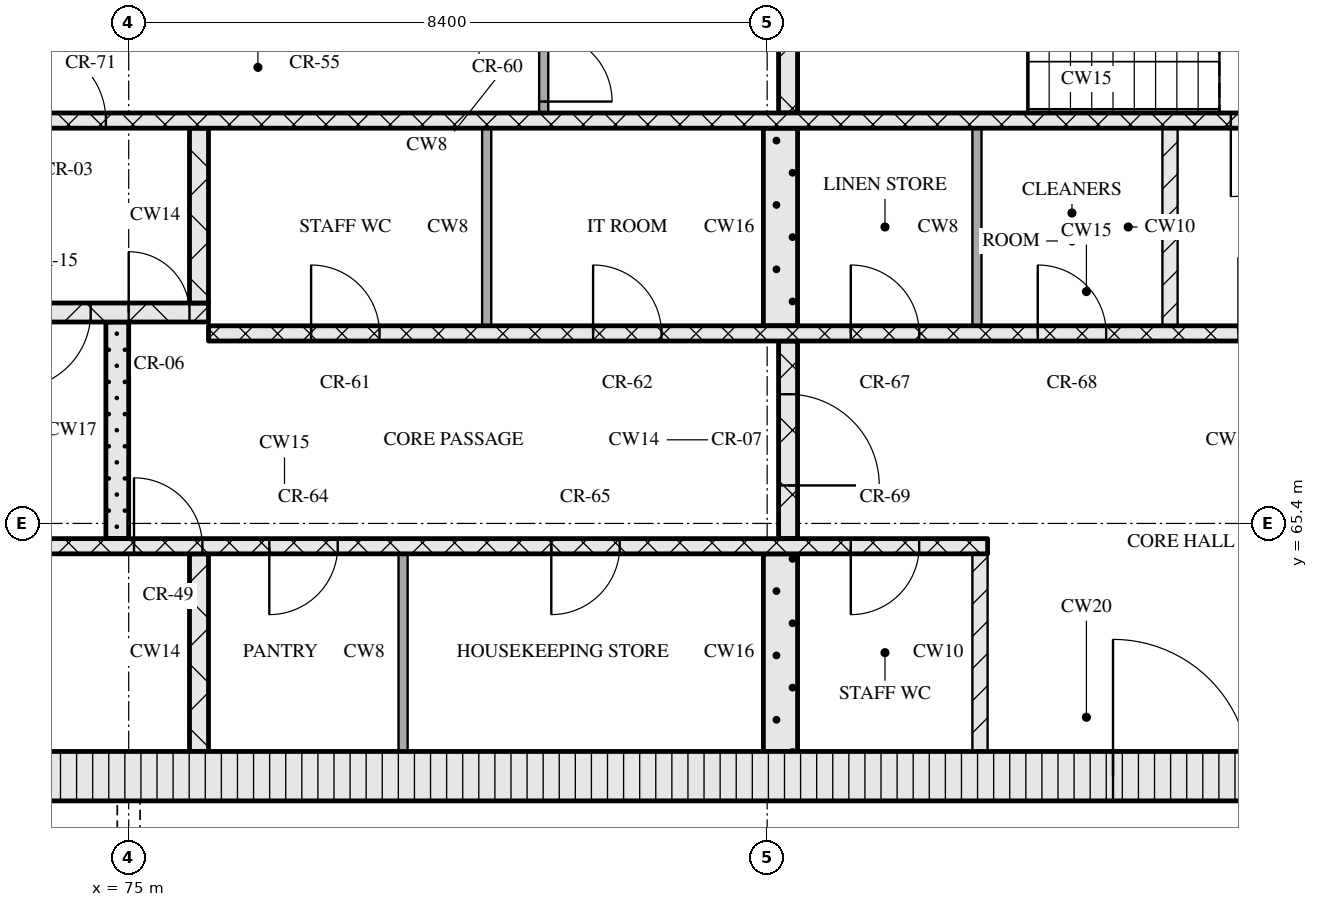
"""IFC4 building model, lengths in metres.
Left out: names, types, materials, properties, quantities, classifications, styles, units other than length and angle.
Written with IfcOpenShell. Run it as: python <this file> out.ifc"""

import sys

from ifc_helpers import new_model, si_unit, direction, frame, frame_2d, origin, place, context, subcontext, project, spatial, rectangle, extrude, element, fill, save


model = new_model("IFC4")
c1 = context("Model", 3, precision=1e-05, world=origin(), true_north=direction((0.0, 1.0)))
c2 = subcontext(c1, "Body", "Model", "MODEL_VIEW")
j1 = project(units=[si_unit("LENGTHUNIT", "METRE"), si_unit("PLANEANGLEUNIT", "RADIAN")], contexts=[c1])
p1 = place(None, origin())
s1 = spatial("IfcSite", under=j1, at=p1, CompositionType="ELEMENT")
p2 = place(p1, origin())
s2 = spatial("IfcBuilding", under=s1, at=p2, CompositionType="ELEMENT")
p3 = place(p2, frame((0.0, 0.0, 234.3)))
s3 = spatial("IfcBuildingStorey", under=s2, at=p3, CompositionType="ELEMENT", Elevation=234.3)
p4 = place(p3, frame((67.15, 62.075, 0.0), z_axis=(0.0, 0.0, 1.0), x_axis=(1.0, 0.0, 0.0)))
e1 = element("IfcWall", 1, at=p4, inside=s3, PredefinedType="SOLIDWALL", context=c2, shape_type="SweptSolid", body=[
    extrude(rectangle(XDim=40.9, YDim=0.65, at=frame_2d((20.45, 0.0))), origin(), (0.0, 0.0, 1.0), 3.32),
])
p5 = place(p4, frame((20.8, 0.0, 0.0)))
e2 = element("IfcOpeningElement", 2, at=p5, cuts=e1, PredefinedType="OPENING", context=c2, shape_type="SweptSolid", body=[
    extrude(rectangle(XDim=1.8, YDim=2.1, at=frame_2d((0.9, 1.05))), frame((0.0, 0.335, 0.0), z_axis=(0.0, -1.0, 0.0), x_axis=(1.0, 0.0, 0.0)), (0.0, 0.0, 1.0), 0.67),
])
p6 = place(p3, frame((75.925, 62.4, 0.0), z_axis=(0.0, 0.0, 1.0), x_axis=(0.0, 1.0, 0.0)))
e3 = element("IfcWall", 3, at=p6, inside=s3, PredefinedType="SOLIDWALL", context=c2, shape_type="SweptSolid", body=[
    extrude(rectangle(XDim=2.6, YDim=0.25, at=frame_2d((1.3, 0.0))), origin(), (0.0, 0.0, 1.0), 3.32),
])
p7 = place(p3, frame((78.61, 62.4, 0.0), z_axis=(0.0, 0.0, 1.0), x_axis=(0.0, 1.0, 0.0)))
e4 = element("IfcWall", 4, at=p7, inside=s3, PredefinedType="PARTITIONING", context=c2, shape_type="SweptSolid", body=[
    extrude(rectangle(XDim=2.6, YDim=0.12, at=frame_2d((1.3, 0.0))), origin(), (0.0, 0.0, 1.0), 3.32),
])
p8 = place(p3, frame((83.575, 62.4, 0.0), z_axis=(0.0, 0.0, 1.0), x_axis=(0.0, 1.0, 0.0)))
e5 = element("IfcWall", 5, at=p8, inside=s3, PredefinedType="SOLIDWALL", context=c2, shape_type="SweptSolid", body=[
    extrude(rectangle(XDim=2.6, YDim=0.45, at=frame_2d((1.3, 0.0))), origin(), (0.0, 0.0, 1.0), 3.32),
])
p9 = place(p3, frame((86.2, 62.4, 0.0), z_axis=(0.0, 0.0, 1.0), x_axis=(0.0, 1.0, 0.0)))
e6 = element("IfcWall", 6, at=p9, inside=s3, PredefinedType="PARTITIONING", context=c2, shape_type="SweptSolid", body=[
    extrude(rectangle(XDim=2.6, YDim=0.2, at=frame_2d((1.3, 0.0))), origin(), (0.0, 0.0, 1.0), 3.32),
])
p10 = place(p3, frame((67.8, 65.1, 0.0), z_axis=(0.0, 0.0, 1.0), x_axis=(1.0, 0.0, 0.0)))
e7 = element("IfcWall", 7, at=p10, inside=s3, PredefinedType="SOLIDWALL", context=c2, shape_type="SweptSolid", body=[
    extrude(rectangle(XDim=18.5, YDim=0.2, at=frame_2d((9.25, 0.0))), origin(), (0.0, 0.0, 1.0), 3.32),
])
p11 = place(p10, frame((7.27, 0.0, 0.0)))
e8 = element("IfcOpeningElement", 8, at=p11, cuts=e7, PredefinedType="OPENING", context=c2, shape_type="SweptSolid", body=[
    extrude(rectangle(XDim=0.9, YDim=2.1, at=frame_2d((0.45, 1.05))), frame((0.0, 0.11, 0.0), z_axis=(0.0, -1.0, 0.0), x_axis=(1.0, 0.0, 0.0)), (0.0, 0.0, 1.0), 0.22),
])
p12 = place(p10, frame((9.05, 0.0, 0.0)))
e9 = element("IfcOpeningElement", 9, at=p12, cuts=e7, PredefinedType="OPENING", context=c2, shape_type="SweptSolid", body=[
    extrude(rectangle(XDim=0.9, YDim=2.1, at=frame_2d((0.45, 1.05))), frame((0.0, 0.11, 0.0), z_axis=(0.0, -1.0, 0.0), x_axis=(1.0, 0.0, 0.0)), (0.0, 0.0, 1.0), 0.22),
])
p13 = place(p10, frame((12.76, 0.0, 0.0)))
e10 = element("IfcOpeningElement", 10, at=p13, cuts=e7, PredefinedType="OPENING", context=c2, shape_type="SweptSolid", body=[
    extrude(rectangle(XDim=0.9, YDim=2.1, at=frame_2d((0.45, 1.05))), frame((0.0, 0.11, 0.0), z_axis=(0.0, -1.0, 0.0), x_axis=(1.0, 0.0, 0.0)), (0.0, 0.0, 1.0), 0.22),
])
p14 = place(p10, frame((16.7, 0.0, 0.0)))
e11 = element("IfcOpeningElement", 11, at=p14, cuts=e7, PredefinedType="OPENING", context=c2, shape_type="SweptSolid", body=[
    extrude(rectangle(XDim=0.9, YDim=2.1, at=frame_2d((0.45, 1.05))), frame((0.0, 0.11, 0.0), z_axis=(0.0, -1.0, 0.0), x_axis=(1.0, 0.0, 0.0)), (0.0, 0.0, 1.0), 0.22),
])
p15 = place(p3, frame((74.85, 65.2, 0.0), z_axis=(0.0, 0.0, 1.0), x_axis=(0.0, 1.0, 0.0)))
e12 = element("IfcWall", 12, at=p15, inside=s3, PredefinedType="SOLIDWALL", context=c2, shape_type="SweptSolid", body=[
    extrude(rectangle(XDim=2.85, YDim=0.3, at=frame_2d((1.425, 0.0))), origin(), (0.0, 0.0, 1.0), 3.32),
])
p16 = place(p3, frame((83.675, 65.2, 0.0), z_axis=(0.0, 0.0, 1.0), x_axis=(0.0, 1.0, 0.0)))
e13 = element("IfcWall", 13, at=p16, inside=s3, PredefinedType="SOLIDWALL", context=c2, shape_type="SweptSolid", body=[
    extrude(rectangle(XDim=2.6, YDim=0.25, at=frame_2d((1.3, 0.0))), origin(), (0.0, 0.0, 1.0), 3.32),
])
p17 = place(p16, frame((0.7, 0.0, 0.0)))
e14 = element("IfcOpeningElement", 14, at=p17, cuts=e13, PredefinedType="OPENING", context=c2, shape_type="SweptSolid", body=[
    extrude(rectangle(XDim=1.2, YDim=2.1, at=frame_2d((0.6, 1.05))), frame((0.0, 0.135, 0.0), z_axis=(0.0, -1.0, 0.0), x_axis=(1.0, 0.0, 0.0)), (0.0, 0.0, 1.0), 0.27),
])
p18 = place(p3, frame((76.05, 67.9, 0.0), z_axis=(0.0, 0.0, 1.0), x_axis=(1.0, 0.0, 0.0)))
e15 = element("IfcWall", 15, at=p18, inside=s3, PredefinedType="SOLIDWALL", context=c2, shape_type="SweptSolid", body=[
    extrude(rectangle(XDim=23.1, YDim=0.2, at=frame_2d((11.55, 0.0))), origin(), (0.0, 0.0, 1.0), 3.32),
])
p19 = place(p18, frame((1.35, 0.0, 0.0)))
e16 = element("IfcOpeningElement", 16, at=p19, cuts=e15, PredefinedType="OPENING", context=c2, shape_type="SweptSolid", body=[
    extrude(rectangle(XDim=0.9, YDim=2.1, at=frame_2d((0.45, 1.05))), frame((0.0, 0.11, 0.0), z_axis=(0.0, -1.0, 0.0), x_axis=(1.0, 0.0, 0.0)), (0.0, 0.0, 1.0), 0.22),
])
p20 = place(p18, frame((5.06, 0.0, 0.0)))
e17 = element("IfcOpeningElement", 17, at=p20, cuts=e15, PredefinedType="OPENING", context=c2, shape_type="SweptSolid", body=[
    extrude(rectangle(XDim=0.9, YDim=2.1, at=frame_2d((0.45, 1.05))), frame((0.0, 0.11, 0.0), z_axis=(0.0, -1.0, 0.0), x_axis=(1.0, 0.0, 0.0)), (0.0, 0.0, 1.0), 0.22),
])
p21 = place(p18, frame((8.45, 0.0, 0.0)))
e18 = element("IfcOpeningElement", 18, at=p21, cuts=e15, PredefinedType="OPENING", context=c2, shape_type="SweptSolid", body=[
    extrude(rectangle(XDim=0.9, YDim=2.1, at=frame_2d((0.45, 1.05))), frame((0.0, 0.11, 0.0), z_axis=(0.0, -1.0, 0.0), x_axis=(1.0, 0.0, 0.0)), (0.0, 0.0, 1.0), 0.22),
])
p22 = place(p18, frame((10.91, 0.0, 0.0)))
e19 = element("IfcOpeningElement", 19, at=p22, cuts=e15, PredefinedType="OPENING", context=c2, shape_type="SweptSolid", body=[
    extrude(rectangle(XDim=0.9, YDim=2.1, at=frame_2d((0.45, 1.05))), frame((0.0, 0.11, 0.0), z_axis=(0.0, -1.0, 0.0), x_axis=(1.0, 0.0, 0.0)), (0.0, 0.0, 1.0), 0.22),
])
p23 = place(p18, frame((13.55, 0.0, 0.0)))
e20 = element("IfcOpeningElement", 20, at=p23, cuts=e15, PredefinedType="OPENING", context=c2, shape_type="SweptSolid", body=[
    extrude(rectangle(XDim=1.0, YDim=2.1, at=frame_2d((0.5, 1.05))), frame((0.0, 0.11, 0.0), z_axis=(0.0, -1.0, 0.0), x_axis=(1.0, 0.0, 0.0)), (0.0, 0.0, 1.0), 0.22),
])
p24 = place(p18, frame((16.2, 0.0, 0.0)))
e21 = element("IfcOpeningElement", 21, at=p24, cuts=e15, PredefinedType="OPENING", context=c2, shape_type="SweptSolid", body=[
    extrude(rectangle(XDim=1.1, YDim=2.1, at=frame_2d((0.55, 1.05))), frame((0.0, 0.11, 0.0), z_axis=(0.0, -1.0, 0.0), x_axis=(1.0, 0.0, 0.0)), (0.0, 0.0, 1.0), 0.22),
])
p25 = place(p18, frame((18.7, 0.0, 0.0)))
e22 = element("IfcOpeningElement", 22, at=p25, cuts=e15, PredefinedType="OPENING", context=c2, shape_type="SweptSolid", body=[
    extrude(rectangle(XDim=1.1, YDim=2.1, at=frame_2d((0.55, 1.05))), frame((0.0, 0.11, 0.0), z_axis=(0.0, -1.0, 0.0), x_axis=(1.0, 0.0, 0.0)), (0.0, 0.0, 1.0), 0.22),
])
p26 = place(p18, frame((21.2, 0.0, 0.0)))
e23 = element("IfcOpeningElement", 23, at=p26, cuts=e15, PredefinedType="OPENING", context=c2, shape_type="SweptSolid", body=[
    extrude(rectangle(XDim=1.1, YDim=2.1, at=frame_2d((0.55, 1.05))), frame((0.0, 0.11, 0.0), z_axis=(0.0, -1.0, 0.0), x_axis=(1.0, 0.0, 0.0)), (0.0, 0.0, 1.0), 0.22),
])
p27 = place(p3, frame((79.71, 68.0, 0.0), z_axis=(0.0, 0.0, 1.0), x_axis=(0.0, 1.0, 0.0)))
e24 = element("IfcWall", 24, at=p27, inside=s3, PredefinedType="PARTITIONING", context=c2, shape_type="SweptSolid", body=[
    extrude(rectangle(XDim=2.6, YDim=0.12, at=frame_2d((1.3, 0.0))), origin(), (0.0, 0.0, 1.0), 3.32),
])
p28 = place(p3, frame((83.575, 68.0, 0.0), z_axis=(0.0, 0.0, 1.0), x_axis=(0.0, 1.0, 0.0)))
e25 = element("IfcWall", 25, at=p28, inside=s3, PredefinedType="SOLIDWALL", context=c2, shape_type="SweptSolid", body=[
    extrude(rectangle(XDim=2.6, YDim=0.45, at=frame_2d((1.3, 0.0))), origin(), (0.0, 0.0, 1.0), 3.32),
])
p29 = place(p3, frame((86.16, 68.0, 0.0), z_axis=(0.0, 0.0, 1.0), x_axis=(0.0, 1.0, 0.0)))
e26 = element("IfcWall", 26, at=p29, inside=s3, PredefinedType="PARTITIONING", context=c2, shape_type="SweptSolid", body=[
    extrude(rectangle(XDim=2.6, YDim=0.12, at=frame_2d((1.3, 0.0))), origin(), (0.0, 0.0, 1.0), 3.32),
])
p30 = place(p3, frame((88.7, 68.0, 0.0), z_axis=(0.0, 0.0, 1.0), x_axis=(0.0, 1.0, 0.0)))
e27 = element("IfcWall", 27, at=p30, inside=s3, PredefinedType="PARTITIONING", context=c2, shape_type="SweptSolid", body=[
    extrude(rectangle(XDim=2.6, YDim=0.2, at=frame_2d((1.3, 0.0))), origin(), (0.0, 0.0, 1.0), 3.32),
])
p31 = place(p3, frame((67.8, 68.175, 0.0), z_axis=(0.0, 0.0, 1.0), x_axis=(1.0, 0.0, 0.0)))
e28 = element("IfcWall", 28, at=p31, inside=s3, PredefinedType="SOLIDWALL", context=c2, shape_type="SweptSolid", body=[
    extrude(rectangle(XDim=8.25, YDim=0.25, at=frame_2d((4.125, 0.0))), origin(), (0.0, 0.0, 1.0), 3.32),
])
p32 = place(p31, frame((5.7, 0.0, 0.0)))
e29 = element("IfcOpeningElement", 29, at=p32, cuts=e28, PredefinedType="OPENING", context=c2, shape_type="SweptSolid", body=[
    extrude(rectangle(XDim=1.0, YDim=2.1, at=frame_2d((0.5, 1.05))), frame((0.0, 0.135, 0.0), z_axis=(0.0, -1.0, 0.0), x_axis=(1.0, 0.0, 0.0)), (0.0, 0.0, 1.0), 0.27),
])
p33 = place(p31, frame((7.2, 0.0, 0.0)))
e30 = element("IfcOpeningElement", 30, at=p33, cuts=e28, PredefinedType="OPENING", context=c2, shape_type="SweptSolid", body=[
    extrude(rectangle(XDim=0.8, YDim=2.1, at=frame_2d((0.4, 1.05))), frame((0.0, 0.135, 0.0), z_axis=(0.0, -1.0, 0.0), x_axis=(1.0, 0.0, 0.0)), (0.0, 0.0, 1.0), 0.27),
])
p34 = place(p3, frame((75.925, 68.3, 0.0), z_axis=(0.0, 0.0, 1.0), x_axis=(0.0, 1.0, 0.0)))
e31 = element("IfcWall", 31, at=p34, inside=s3, PredefinedType="SOLIDWALL", context=c2, shape_type="SweptSolid", body=[
    extrude(rectangle(XDim=2.3, YDim=0.25, at=frame_2d((1.15, 0.0))), origin(), (0.0, 0.0, 1.0), 3.32),
])
p35 = place(p3, frame((67.8, 70.7, 0.0), z_axis=(0.0, 0.0, 1.0), x_axis=(1.0, 0.0, 0.0)))
e32 = element("IfcWall", 32, at=p35, inside=s3, PredefinedType="SOLIDWALL", context=c2, shape_type="SweptSolid", body=[
    extrude(rectangle(XDim=39.6, YDim=0.2, at=frame_2d((19.8, 0.0))), origin(), (0.0, 0.0, 1.0), 3.32),
])
p36 = place(p35, frame((0.65, 0.0, 0.0)))
e33 = element("IfcOpeningElement", 33, at=p36, cuts=e32, PredefinedType="OPENING", context=c2, shape_type="SweptSolid", body=[
    extrude(rectangle(XDim=1.1, YDim=2.1, at=frame_2d((0.55, 1.05))), frame((0.0, 0.11, 0.0), z_axis=(0.0, -1.0, 0.0), x_axis=(1.0, 0.0, 0.0)), (0.0, 0.0, 1.0), 0.22),
])
p37 = place(p35, frame((3.25, 0.0, 0.0)))
e34 = element("IfcOpeningElement", 34, at=p37, cuts=e32, PredefinedType="OPENING", context=c2, shape_type="SweptSolid", body=[
    extrude(rectangle(XDim=1.1, YDim=2.1, at=frame_2d((0.55, 1.05))), frame((0.0, 0.11, 0.0), z_axis=(0.0, -1.0, 0.0), x_axis=(1.0, 0.0, 0.0)), (0.0, 0.0, 1.0), 0.22),
])
p38 = place(p35, frame((5.9, 0.0, 0.0)))
e35 = element("IfcOpeningElement", 35, at=p38, cuts=e32, PredefinedType="OPENING", context=c2, shape_type="SweptSolid", body=[
    extrude(rectangle(XDim=1.0, YDim=2.1, at=frame_2d((0.5, 1.05))), frame((0.0, 0.11, 0.0), z_axis=(0.0, -1.0, 0.0), x_axis=(1.0, 0.0, 0.0)), (0.0, 0.0, 1.0), 0.22),
])
p39 = place(p35, frame((21.7, 0.0, 0.0)))
e36 = element("IfcOpeningElement", 36, at=p39, cuts=e32, PredefinedType="OPENING", context=c2, shape_type="SweptSolid", body=[
    extrude(rectangle(XDim=1.0, YDim=2.1, at=frame_2d((0.5, 1.05))), frame((0.0, 0.11, 0.0), z_axis=(0.0, -1.0, 0.0), x_axis=(1.0, 0.0, 0.0)), (0.0, 0.0, 1.0), 0.22),
])
p40 = place(p35, frame((32.7, 0.0, 0.0)))
e37 = element("IfcOpeningElement", 37, at=p40, cuts=e32, PredefinedType="OPENING", context=c2, shape_type="SweptSolid", body=[
    extrude(rectangle(XDim=1.0, YDim=2.1, at=frame_2d((0.5, 1.05))), frame((0.0, 0.11, 0.0), z_axis=(0.0, -1.0, 0.0), x_axis=(1.0, 0.0, 0.0)), (0.0, 0.0, 1.0), 0.22),
])
p41 = place(p35, frame((35.25, 0.0, 0.0)))
e38 = element("IfcOpeningElement", 38, at=p41, cuts=e32, PredefinedType="OPENING", context=c2, shape_type="SweptSolid", body=[
    extrude(rectangle(XDim=1.1, YDim=2.1, at=frame_2d((0.55, 1.05))), frame((0.0, 0.11, 0.0), z_axis=(0.0, -1.0, 0.0), x_axis=(1.0, 0.0, 0.0)), (0.0, 0.0, 1.0), 0.22),
])
p42 = place(p35, frame((37.85, 0.0, 0.0)))
e39 = element("IfcOpeningElement", 39, at=p42, cuts=e32, PredefinedType="OPENING", context=c2, shape_type="SweptSolid", body=[
    extrude(rectangle(XDim=1.1, YDim=2.1, at=frame_2d((0.55, 1.05))), frame((0.0, 0.11, 0.0), z_axis=(0.0, -1.0, 0.0), x_axis=(1.0, 0.0, 0.0)), (0.0, 0.0, 1.0), 0.22),
])
p43 = place(p3, frame((80.46, 70.8, 0.0), z_axis=(0.0, 0.0, 1.0), x_axis=(0.0, 1.0, 0.0)))
e40 = element("IfcWall", 40, at=p43, inside=s3, PredefinedType="PARTITIONING", context=c2, shape_type="SweptSolid", body=[
    extrude(rectangle(XDim=1.2, YDim=0.12, at=frame_2d((0.6, 0.0))), origin(), (0.0, 0.0, 1.0), 3.32),
])
p44 = place(p43, frame((0.15, 0.0, 0.0)))
e41 = element("IfcOpeningElement", 41, at=p44, cuts=e40, PredefinedType="OPENING", context=c2, shape_type="SweptSolid", body=[
    extrude(rectangle(XDim=0.9, YDim=2.1, at=frame_2d((0.45, 1.05))), frame((0.0, 0.07, 0.0), z_axis=(0.0, -1.0, 0.0), x_axis=(1.0, 0.0, 0.0)), (0.0, 0.0, 1.0), 0.14),
])
p45 = place(p3, frame((83.675, 70.8, 0.0), z_axis=(0.0, 0.0, 1.0), x_axis=(0.0, 1.0, 0.0)))
e42 = element("IfcWall", 42, at=p45, inside=s3, PredefinedType="SOLIDWALL", context=c2, shape_type="SweptSolid", body=[
    extrude(rectangle(XDim=2.95, YDim=0.25, at=frame_2d((1.475, 0.0))), origin(), (0.0, 0.0, 1.0), 3.32),
])
p46 = place(p5, origin())
e43 = element("IfcDoor", 43, at=p46, inside=s3, OperationType="DOUBLE_DOOR_SINGLE_SWING", PredefinedType="DOOR", context=c2, shape_type="SweptSolid", body=[
    extrude(rectangle(XDim=1.8, YDim=2.1, at=frame_2d((0.9, 1.05))), frame((0.0, 0.025, 0.0), z_axis=(0.0, -1.0, 0.0), x_axis=(1.0, 0.0, 0.0)), (0.0, 0.0, 1.0), 0.05),
])
fill(e2, e43)
p47 = place(p11, origin())
e44 = element("IfcDoor", 44, at=p47, inside=s3, OperationType="SINGLE_SWING_LEFT", PredefinedType="DOOR", context=c2, shape_type="SweptSolid", body=[
    extrude(rectangle(XDim=0.9, YDim=2.1, at=frame_2d((0.45, 1.05))), frame((0.0, 0.025, 0.0), z_axis=(0.0, -1.0, 0.0), x_axis=(1.0, 0.0, 0.0)), (0.0, 0.0, 1.0), 0.05),
])
fill(e8, e44)
p48 = place(p12, origin())
e45 = element("IfcDoor", 45, at=p48, inside=s3, OperationType="SINGLE_SWING_RIGHT", PredefinedType="DOOR", context=c2, shape_type="SweptSolid", body=[
    extrude(rectangle(XDim=0.9, YDim=2.1, at=frame_2d((0.45, 1.05))), frame((0.0, 0.025, 0.0), z_axis=(0.0, -1.0, 0.0), x_axis=(1.0, 0.0, 0.0)), (0.0, 0.0, 1.0), 0.05),
])
fill(e9, e45)
p49 = place(p13, origin())
e46 = element("IfcDoor", 46, at=p49, inside=s3, OperationType="SINGLE_SWING_RIGHT", PredefinedType="DOOR", context=c2, shape_type="SweptSolid", body=[
    extrude(rectangle(XDim=0.9, YDim=2.1, at=frame_2d((0.45, 1.05))), frame((0.0, 0.025, 0.0), z_axis=(0.0, -1.0, 0.0), x_axis=(1.0, 0.0, 0.0)), (0.0, 0.0, 1.0), 0.05),
])
fill(e10, e46)
p50 = place(p14, origin())
e47 = element("IfcDoor", 47, at=p50, inside=s3, OperationType="SINGLE_SWING_RIGHT", PredefinedType="DOOR", context=c2, shape_type="SweptSolid", body=[
    extrude(rectangle(XDim=0.9, YDim=2.1, at=frame_2d((0.45, 1.05))), frame((0.0, 0.025, 0.0), z_axis=(0.0, -1.0, 0.0), x_axis=(1.0, 0.0, 0.0)), (0.0, 0.0, 1.0), 0.05),
])
fill(e11, e47)
p51 = place(p17, origin())
e48 = element("IfcDoor", 48, at=p51, inside=s3, OperationType="SINGLE_SWING_RIGHT", PredefinedType="DOOR", context=c2, shape_type="SweptSolid", body=[
    extrude(rectangle(XDim=1.2, YDim=2.1, at=frame_2d((0.6, 1.05))), frame((0.0, 0.025, 0.0), z_axis=(0.0, -1.0, 0.0), x_axis=(1.0, 0.0, 0.0)), (0.0, 0.0, 1.0), 0.05),
])
fill(e14, e48)
p52 = place(p19, origin())
e49 = element("IfcDoor", 49, at=p52, inside=s3, OperationType="SINGLE_SWING_LEFT", PredefinedType="DOOR", context=c2, shape_type="SweptSolid", body=[
    extrude(rectangle(XDim=0.9, YDim=2.1, at=frame_2d((0.45, 1.05))), frame((0.0, 0.025, 0.0), z_axis=(0.0, -1.0, 0.0), x_axis=(1.0, 0.0, 0.0)), (0.0, 0.0, 1.0), 0.05),
])
fill(e16, e49)
p53 = place(p20, origin())
e50 = element("IfcDoor", 50, at=p53, inside=s3, OperationType="SINGLE_SWING_LEFT", PredefinedType="DOOR", context=c2, shape_type="SweptSolid", body=[
    extrude(rectangle(XDim=0.9, YDim=2.1, at=frame_2d((0.45, 1.05))), frame((0.0, 0.025, 0.0), z_axis=(0.0, -1.0, 0.0), x_axis=(1.0, 0.0, 0.0)), (0.0, 0.0, 1.0), 0.05),
])
fill(e17, e50)
p54 = place(p21, origin())
e51 = element("IfcDoor", 51, at=p54, inside=s3, OperationType="SINGLE_SWING_LEFT", PredefinedType="DOOR", context=c2, shape_type="SweptSolid", body=[
    extrude(rectangle(XDim=0.9, YDim=2.1, at=frame_2d((0.45, 1.05))), frame((0.0, 0.025, 0.0), z_axis=(0.0, -1.0, 0.0), x_axis=(1.0, 0.0, 0.0)), (0.0, 0.0, 1.0), 0.05),
])
fill(e18, e51)
p55 = place(p22, origin())
e52 = element("IfcDoor", 52, at=p55, inside=s3, OperationType="SINGLE_SWING_LEFT", PredefinedType="DOOR", context=c2, shape_type="SweptSolid", body=[
    extrude(rectangle(XDim=0.9, YDim=2.1, at=frame_2d((0.45, 1.05))), frame((0.0, 0.025, 0.0), z_axis=(0.0, -1.0, 0.0), x_axis=(1.0, 0.0, 0.0)), (0.0, 0.0, 1.0), 0.05),
])
fill(e19, e52)
p56 = place(p32, origin())
e53 = element("IfcDoor", 53, at=p56, inside=s3, OperationType="SINGLE_SWING_RIGHT", PredefinedType="DOOR", context=c2, shape_type="SweptSolid", body=[
    extrude(rectangle(XDim=1.0, YDim=2.1, at=frame_2d((0.5, 1.05))), frame((0.0, 0.025, 0.0), z_axis=(0.0, -1.0, 0.0), x_axis=(1.0, 0.0, 0.0)), (0.0, 0.0, 1.0), 0.05),
])
fill(e29, e53)
p57 = place(p33, origin())
e54 = element("IfcDoor", 54, at=p57, inside=s3, OperationType="SINGLE_SWING_LEFT", PredefinedType="DOOR", context=c2, shape_type="SweptSolid", body=[
    extrude(rectangle(XDim=0.8, YDim=2.1, at=frame_2d((0.4, 1.05))), frame((0.0, 0.025, 0.0), z_axis=(0.0, -1.0, 0.0), x_axis=(1.0, 0.0, 0.0)), (0.0, 0.0, 1.0), 0.05),
])
fill(e30, e54)
p58 = place(p38, origin())
e55 = element("IfcDoor", 55, at=p58, inside=s3, OperationType="SINGLE_SWING_LEFT", PredefinedType="DOOR", context=c2, shape_type="SweptSolid", body=[
    extrude(rectangle(XDim=1.0, YDim=2.1, at=frame_2d((0.5, 1.05))), frame((0.0, 0.025, 0.0), z_axis=(0.0, -1.0, 0.0), x_axis=(1.0, 0.0, 0.0)), (0.0, 0.0, 1.0), 0.05),
])
fill(e35, e55)
p59 = place(p39, origin())
e56 = element("IfcDoor", 56, at=p59, inside=s3, OperationType="SINGLE_SWING_RIGHT", PredefinedType="DOOR", context=c2, shape_type="SweptSolid", body=[
    extrude(rectangle(XDim=1.0, YDim=2.1, at=frame_2d((0.5, 1.05))), frame((0.0, 0.025, 0.0), z_axis=(0.0, -1.0, 0.0), x_axis=(1.0, 0.0, 0.0)), (0.0, 0.0, 1.0), 0.05),
])
fill(e36, e56)
p60 = place(p44, origin())
e57 = element("IfcDoor", 57, at=p60, inside=s3, OperationType="SINGLE_SWING_RIGHT", PredefinedType="DOOR", context=c2, shape_type="SweptSolid", body=[
    extrude(rectangle(XDim=0.9, YDim=2.1, at=frame_2d((0.45, 1.05))), frame((0.0, 0.025, 0.0), z_axis=(0.0, -1.0, 0.0), x_axis=(1.0, 0.0, 0.0)), (0.0, 0.0, 1.0), 0.05),
])
fill(e41, e57)
save(model, sys.argv[1])
